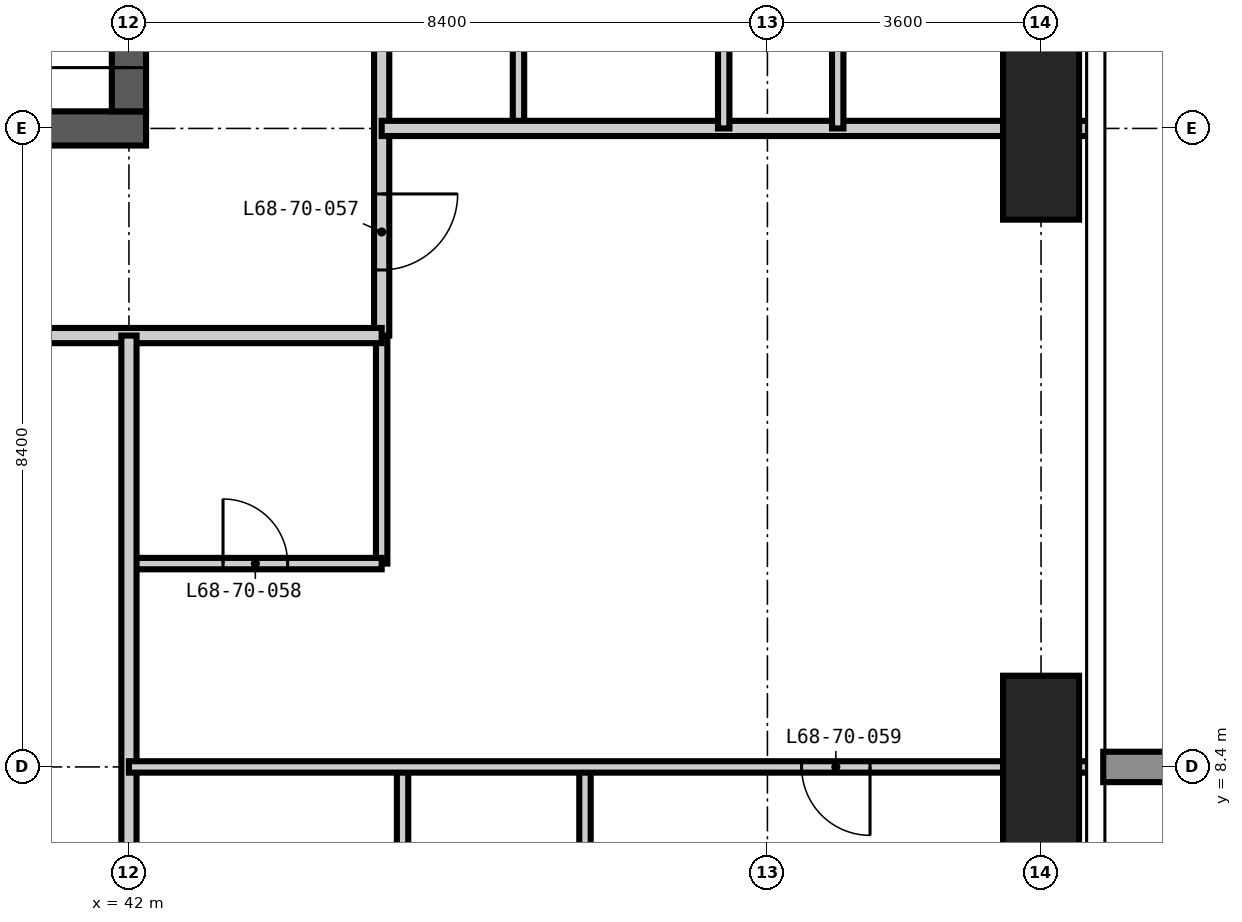
"""IFC4 building model, lengths in metres.
Left out: names, types, materials, properties, quantities, classifications, styles, units other than length and angle.
Written with IfcOpenShell. Run it as: python <this file> out.ifc"""

import sys

from ifc_helpers import new_model, si_unit, direction, frame, frame_2d, origin, origin_2d, place, context, subcontext, project, spatial, rectangle, extrude, element, fill, save


model = new_model("IFC4")
c1 = context("Model", 3, precision=1e-05, world=origin(), true_north=direction((0.0, 1.0)))
c2 = subcontext(c1, "Body", "Model", "MODEL_VIEW")
j1 = project(units=[si_unit("LENGTHUNIT", "METRE"), si_unit("PLANEANGLEUNIT", "RADIAN")], contexts=[c1])
p1 = place(None, origin())
s1 = spatial("IfcSite", under=j1, at=p1, CompositionType="ELEMENT")
p2 = place(p1, origin())
s2 = spatial("IfcBuilding", under=s1, at=p2, CompositionType="ELEMENT")
p3 = place(p2, frame((0.0, 0.0, 264.6)))
s3 = spatial("IfcBuildingStorey", under=s2, at=p3, CompositionType="ELEMENT", Elevation=264.6)
for number, where, z_axis, x_axis in (
    (1, (54.0, 8.4, -0.35), (0.0, 0.0, 1.0), (1.0, 0.0, 0.0)),
    (2, (54.0, 16.8, -0.35), (0.0, 0.0, 1.0), (1.0, 0.0, 0.0)),
):
    element("IfcColumn", number, at=place(p3, frame(where, z_axis=z_axis, x_axis=x_axis)), inside=s3, PredefinedType="COLUMN", context=c2, shape_type="SweptSolid", body=[
        extrude(rectangle(XDim=1.0, YDim=2.4, at=origin_2d()), origin(), (0.0, 0.0, 1.0), 3.9),
    ])
p4 = place(p3, frame((24.975, 16.8, -0.35), z_axis=(0.0, 0.0, 1.0), x_axis=(1.0, 0.0, 0.0)))
e3 = element("IfcWall", 3, at=p4, inside=s3, PredefinedType="SHEAR", context=c2, shape_type="SweptSolid", body=[
    extrude(rectangle(XDim=17.25, YDim=0.45, at=frame_2d((8.625, 0.0))), origin(), (0.0, 0.0, 1.0), 3.9),
])
p5 = place(p4, frame((3.925, 0.0, 0.35)))
e4 = element("IfcOpeningElement", 4, at=p5, cuts=e3, PredefinedType="OPENING", context=c2, shape_type="SweptSolid", body=[
    extrude(rectangle(XDim=1.0, YDim=2.1, at=frame_2d((0.5, 1.05))), frame((0.0, 0.235, 0.0), z_axis=(0.0, -1.0, 0.0), x_axis=(1.0, 0.0, 0.0)), (0.0, 0.0, 1.0), 0.47),
])
p6 = place(p4, frame((10.225, 0.0, 0.35)))
e5 = element("IfcOpeningElement", 5, at=p6, cuts=e3, PredefinedType="OPENING", context=c2, shape_type="SweptSolid", body=[
    extrude(rectangle(XDim=1.0, YDim=2.1, at=frame_2d((0.5, 1.05))), frame((0.0, 0.235, 0.0), z_axis=(0.0, -1.0, 0.0), x_axis=(1.0, 0.0, 0.0)), (0.0, 0.0, 1.0), 0.47),
])
p7 = place(p3, frame((42.0, 17.025, -0.35), z_axis=(0.0, 0.0, 1.0), x_axis=(0.0, 1.0, 0.0)))
e6 = element("IfcWall", 6, at=p7, inside=s3, PredefinedType="SHEAR", context=c2, shape_type="SweptSolid", body=[
    extrude(rectangle(XDim=24.75, YDim=0.45, at=frame_2d((12.375, 0.0))), origin(), (0.0, 0.0, 1.0), 3.9),
])
p8 = place(p7, frame((0.575, 0.0, 0.35)))
e7 = element("IfcOpeningElement", 7, at=p8, cuts=e6, PredefinedType="OPENING", context=c2, shape_type="SweptSolid", body=[
    extrude(rectangle(XDim=1.2, YDim=2.2, at=frame_2d((0.6, 1.1))), frame((0.0, 0.235, 0.0), z_axis=(0.0, -1.0, 0.0), x_axis=(1.0, 0.0, 0.0)), (0.0, 0.0, 1.0), 0.47),
])
p9 = place(p7, frame((11.475, 0.0, 0.35)))
e8 = element("IfcOpeningElement", 8, at=p9, cuts=e6, PredefinedType="OPENING", context=c2, shape_type="SweptSolid", body=[
    extrude(rectangle(XDim=1.8, YDim=2.2, at=frame_2d((0.9, 1.1))), frame((0.0, 0.235, 0.0), z_axis=(0.0, -1.0, 0.0), x_axis=(1.0, 0.0, 0.0)), (0.0, 0.0, 1.0), 0.47),
])
p10 = place(p7, frame((20.275, 0.0, 0.35)))
e9 = element("IfcOpeningElement", 9, at=p10, cuts=e6, PredefinedType="OPENING", context=c2, shape_type="SweptSolid", body=[
    extrude(rectangle(XDim=1.0, YDim=2.1, at=frame_2d((0.5, 1.05))), frame((0.0, 0.235, 0.0), z_axis=(0.0, -1.0, 0.0), x_axis=(1.0, 0.0, 0.0)), (0.0, 0.0, 1.0), 0.47),
])
p11 = place(p3, frame((45.325, 11.075, 0.0), z_axis=(0.0, 0.0, 1.0), x_axis=(0.0, 1.0, 0.0)))
e10 = element("IfcWall", 10, at=p11, inside=s3, PredefinedType="PARTITIONING", context=c2, shape_type="SweptSolid", body=[
    extrude(rectangle(XDim=3.0, YDim=0.15, at=frame_2d((1.5, 0.0))), origin(), (0.0, 0.0, 1.0), 3.55),
])
p12 = place(p3, frame((47.125, 16.8, 0.0), z_axis=(0.0, 0.0, 1.0), x_axis=(0.0, 1.0, 0.0)))
e11 = element("IfcWall", 11, at=p12, inside=s3, PredefinedType="PARTITIONING", context=c2, shape_type="SweptSolid", body=[
    extrude(rectangle(XDim=3.0, YDim=0.15, at=frame_2d((1.5, 0.0))), origin(), (0.0, 0.0, 1.0), 3.55),
])
p13 = place(p12, frame((1.075, 0.0, 0.0)))
e12 = element("IfcOpeningElement", 12, at=p13, cuts=e11, PredefinedType="OPENING", context=c2, shape_type="SweptSolid", body=[
    extrude(rectangle(XDim=0.85, YDim=2.1, at=frame_2d((0.425, 1.05))), frame((0.0, 0.085, 0.0), z_axis=(0.0, -1.0, 0.0), x_axis=(1.0, 0.0, 0.0)), (0.0, 0.0, 1.0), 0.17),
])
p14 = place(p3, frame((42.0, 11.075, 0.0), z_axis=(0.0, 0.0, 1.0), x_axis=(1.0, 0.0, 0.0)))
e13 = element("IfcWall", 13, at=p14, inside=s3, PredefinedType="PARTITIONING", context=c2, shape_type="SweptSolid", body=[
    extrude(rectangle(XDim=3.325, YDim=0.15, at=frame_2d((1.663, 0.0))), origin(), (0.0, 0.0, 1.0), 3.55),
])
p15 = place(p14, frame((1.238, 0.0, 0.0)))
e14 = element("IfcOpeningElement", 14, at=p15, cuts=e13, PredefinedType="OPENING", context=c2, shape_type="SweptSolid", body=[
    extrude(rectangle(XDim=0.85, YDim=2.1, at=frame_2d((0.425, 1.05))), frame((0.0, 0.085, 0.0), z_axis=(0.0, -1.0, 0.0), x_axis=(1.0, 0.0, 0.0)), (0.0, 0.0, 1.0), 0.17),
])
p16 = place(p3, frame((45.325, 33.6, 0.0), z_axis=(0.0, 0.0, 1.0), x_axis=(0.0, -1.0, 0.0)))
e15 = element("IfcWall", 15, at=p16, inside=s3, PredefinedType="PARTITIONING", context=c2, shape_type="SweptSolid", body=[
    extrude(rectangle(XDim=19.525, YDim=0.2, at=frame_2d((9.763, 0.0))), origin(), (0.0, 0.0, 1.0), 3.55),
])
p17 = place(p16, frame((9.1, 0.0, 0.0)))
e16 = element("IfcOpeningElement", 16, at=p17, cuts=e15, PredefinedType="OPENING", context=c2, shape_type="SweptSolid", body=[
    extrude(rectangle(XDim=1.0, YDim=2.2, at=frame_2d((0.5, 1.1))), frame((0.0, 0.11, 0.0), z_axis=(0.0, -1.0, 0.0), x_axis=(1.0, 0.0, 0.0)), (0.0, 0.0, 1.0), 0.22),
])
p18 = place(p16, frame((17.662, 0.0, 0.0)))
e17 = element("IfcOpeningElement", 17, at=p18, cuts=e15, PredefinedType="OPENING", context=c2, shape_type="SweptSolid", body=[
    extrude(rectangle(XDim=1.0, YDim=2.2, at=frame_2d((0.5, 1.1))), frame((0.0, 0.11, 0.0), z_axis=(0.0, -1.0, 0.0), x_axis=(1.0, 0.0, 0.0)), (0.0, 0.0, 1.0), 0.22),
])
p19 = place(p3, frame((45.325, 14.075, 0.0), z_axis=(0.0, 0.0, 1.0), x_axis=(-1.0, 0.0, 0.0)))
e18 = element("IfcWall", 18, at=p19, inside=s3, PredefinedType="PARTITIONING", context=c2, shape_type="SweptSolid", body=[
    extrude(rectangle(XDim=22.85, YDim=0.2, at=frame_2d((11.425, 0.0))), origin(), (0.0, 0.0, 1.0), 3.55),
])
p20 = place(p19, frame((17.525, 0.0, 0.0)))
e19 = element("IfcOpeningElement", 19, at=p20, cuts=e18, PredefinedType="OPENING", context=c2, shape_type="SweptSolid", body=[
    extrude(rectangle(XDim=1.0, YDim=2.2, at=frame_2d((0.5, 1.1))), frame((0.0, 0.11, 0.0), z_axis=(0.0, -1.0, 0.0), x_axis=(1.0, 0.0, 0.0)), (0.0, 0.0, 1.0), 0.22),
])
p21 = place(p19, frame((11.225, 0.0, 0.0)))
e20 = element("IfcOpeningElement", 20, at=p21, cuts=e18, PredefinedType="OPENING", context=c2, shape_type="SweptSolid", body=[
    extrude(rectangle(XDim=1.0, YDim=2.2, at=frame_2d((0.5, 1.1))), frame((0.0, 0.11, 0.0), z_axis=(0.0, -1.0, 0.0), x_axis=(1.0, 0.0, 0.0)), (0.0, 0.0, 1.0), 0.22),
])
p22 = place(p19, frame((4.925, 0.0, 0.0)))
e21 = element("IfcOpeningElement", 21, at=p22, cuts=e18, PredefinedType="OPENING", context=c2, shape_type="SweptSolid", body=[
    extrude(rectangle(XDim=1.0, YDim=2.2, at=frame_2d((0.5, 1.1))), frame((0.0, 0.11, 0.0), z_axis=(0.0, -1.0, 0.0), x_axis=(1.0, 0.0, 0.0)), (0.0, 0.0, 1.0), 0.22),
])
p23 = place(p3, frame((42.0, 4.182, 0.0), z_axis=(0.0, 0.0, 1.0), x_axis=(0.0, 1.0, 0.0)))
e22 = element("IfcWall", 22, at=p23, inside=s3, PredefinedType="PARTITIONING", context=c2, shape_type="SweptSolid", body=[
    extrude(rectangle(XDim=9.893, YDim=0.2, at=frame_2d((4.947, 0.0))), origin(), (0.0, 0.0, 1.0), 3.55),
])
p24 = place(p3, frame((45.325, 16.8, 0.0), z_axis=(0.0, 0.0, 1.0), x_axis=(1.0, 0.0, 0.0)))
e23 = element("IfcWall", 23, at=p24, inside=s3, PredefinedType="PARTITIONING", context=c2, shape_type="SweptSolid", body=[
    extrude(rectangle(XDim=9.293, YDim=0.2, at=frame_2d((4.646, 0.0))), origin(), (0.0, 0.0, 1.0), 3.55),
])
p25 = place(p3, frame((45.6, 5.4, 0.0), z_axis=(0.0, 0.0, 1.0), x_axis=(0.0, 1.0, 0.0)))
e24 = element("IfcWall", 24, at=p25, inside=s3, PredefinedType="PARTITIONING", context=c2, shape_type="SweptSolid", body=[
    extrude(rectangle(XDim=3.0, YDim=0.15, at=frame_2d((1.5, 0.0))), origin(), (0.0, 0.0, 1.0), 3.55),
])
p26 = place(p3, frame((48.0, 5.4, 0.0), z_axis=(0.0, 0.0, 1.0), x_axis=(0.0, 1.0, 0.0)))
e25 = element("IfcWall", 25, at=p26, inside=s3, PredefinedType="PARTITIONING", context=c2, shape_type="SweptSolid", body=[
    extrude(rectangle(XDim=3.0, YDim=0.15, at=frame_2d((1.5, 0.0))), origin(), (0.0, 0.0, 1.0), 3.55),
])
p27 = place(p26, frame((1.05, 0.0, 0.0)))
e26 = element("IfcOpeningElement", 26, at=p27, cuts=e25, PredefinedType="OPENING", context=c2, shape_type="SweptSolid", body=[
    extrude(rectangle(XDim=0.9, YDim=2.1, at=frame_2d((0.45, 1.05))), frame((0.0, 0.085, 0.0), z_axis=(0.0, -1.0, 0.0), x_axis=(1.0, 0.0, 0.0)), (0.0, 0.0, 1.0), 0.17),
])
p28 = place(p3, frame((49.825, 16.8, 0.0), z_axis=(0.0, 0.0, 1.0), x_axis=(0.0, 1.0, 0.0)))
e27 = element("IfcWall", 27, at=p28, inside=s3, PredefinedType="PARTITIONING", context=c2, shape_type="SweptSolid", body=[
    extrude(rectangle(XDim=3.0, YDim=0.15, at=frame_2d((1.5, 0.0))), origin(), (0.0, 0.0, 1.0), 3.55),
])
p29 = place(p3, frame((51.325, 16.8, 0.0), z_axis=(0.0, 0.0, 1.0), x_axis=(0.0, 1.0, 0.0)))
e28 = element("IfcWall", 28, at=p29, inside=s3, PredefinedType="PARTITIONING", context=c2, shape_type="SweptSolid", body=[
    extrude(rectangle(XDim=3.0, YDim=0.15, at=frame_2d((1.5, 0.0))), origin(), (0.0, 0.0, 1.0), 3.55),
])
p30 = place(p29, frame((1.05, 0.0, 0.0)))
e29 = element("IfcOpeningElement", 29, at=p30, cuts=e28, PredefinedType="OPENING", context=c2, shape_type="SweptSolid", body=[
    extrude(rectangle(XDim=0.9, YDim=2.1, at=frame_2d((0.45, 1.05))), frame((0.0, 0.085, 0.0), z_axis=(0.0, -1.0, 0.0), x_axis=(1.0, 0.0, 0.0)), (0.0, 0.0, 1.0), 0.17),
])
p31 = place(p3, frame((42.0, 8.4, 0.0), z_axis=(0.0, 0.0, 1.0), x_axis=(1.0, 0.0, 0.0)))
e30 = element("IfcWall", 30, at=p31, inside=s3, PredefinedType="PARTITIONING", context=c2, shape_type="SweptSolid", body=[
    extrude(rectangle(XDim=12.618, YDim=0.15, at=frame_2d((6.309, 0.0))), origin(), (0.0, 0.0, 1.0), 3.55),
])
p32 = place(p31, frame((8.85, 0.0, 0.0)))
e31 = element("IfcOpeningElement", 31, at=p32, cuts=e30, PredefinedType="OPENING", context=c2, shape_type="SweptSolid", body=[
    extrude(rectangle(XDim=0.9, YDim=2.1, at=frame_2d((0.45, 1.05))), frame((0.0, 0.085, 0.0), z_axis=(0.0, -1.0, 0.0), x_axis=(1.0, 0.0, 0.0)), (0.0, 0.0, 1.0), 0.17),
])
p33 = place(p8, origin())
e32 = element("IfcDoor", 32, at=p33, inside=s3, OperationType="SINGLE_SWING_LEFT", PredefinedType="DOOR", context=c2, shape_type="SweptSolid", body=[
    extrude(rectangle(XDim=1.2, YDim=2.2, at=frame_2d((0.6, 1.1))), frame((0.0, 0.025, 0.0), z_axis=(0.0, -1.0, 0.0), x_axis=(1.0, 0.0, 0.0)), (0.0, 0.0, 1.0), 0.05),
])
fill(e7, e32)
p34 = place(p18, origin())
e33 = element("IfcDoor", 33, at=p34, inside=s3, OperationType="SINGLE_SWING_LEFT", PredefinedType="DOOR", context=c2, shape_type="SweptSolid", body=[
    extrude(rectangle(XDim=1.0, YDim=2.2, at=frame_2d((0.5, 1.1))), frame((0.0, 0.025, 0.0), z_axis=(0.0, -1.0, 0.0), x_axis=(1.0, 0.0, 0.0)), (0.0, 0.0, 1.0), 0.05),
])
fill(e17, e33)
p35 = place(p15, origin())
e34 = element("IfcDoor", 34, at=p35, inside=s3, OperationType="SINGLE_SWING_LEFT", PredefinedType="DOOR", context=c2, shape_type="SweptSolid", body=[
    extrude(rectangle(XDim=0.85, YDim=2.1, at=frame_2d((0.425, 1.05))), frame((0.0, 0.025, 0.0), z_axis=(0.0, -1.0, 0.0), x_axis=(1.0, 0.0, 0.0)), (0.0, 0.0, 1.0), 0.05),
])
fill(e14, e34)
p36 = place(p32, frame((0.9, 0.0, 0.0), z_axis=(0.0, 0.0, 1.0), x_axis=(-1.0, 0.0, 0.0)))
e35 = element("IfcDoor", 35, at=p36, inside=s3, OperationType="SINGLE_SWING_LEFT", PredefinedType="DOOR", context=c2, shape_type="SweptSolid", body=[
    extrude(rectangle(XDim=0.9, YDim=2.1, at=frame_2d((0.45, 1.05))), frame((0.0, 0.025, 0.0), z_axis=(0.0, -1.0, 0.0), x_axis=(1.0, 0.0, 0.0)), (0.0, 0.0, 1.0), 0.05),
])
fill(e31, e35)
save(model, sys.argv[1])
